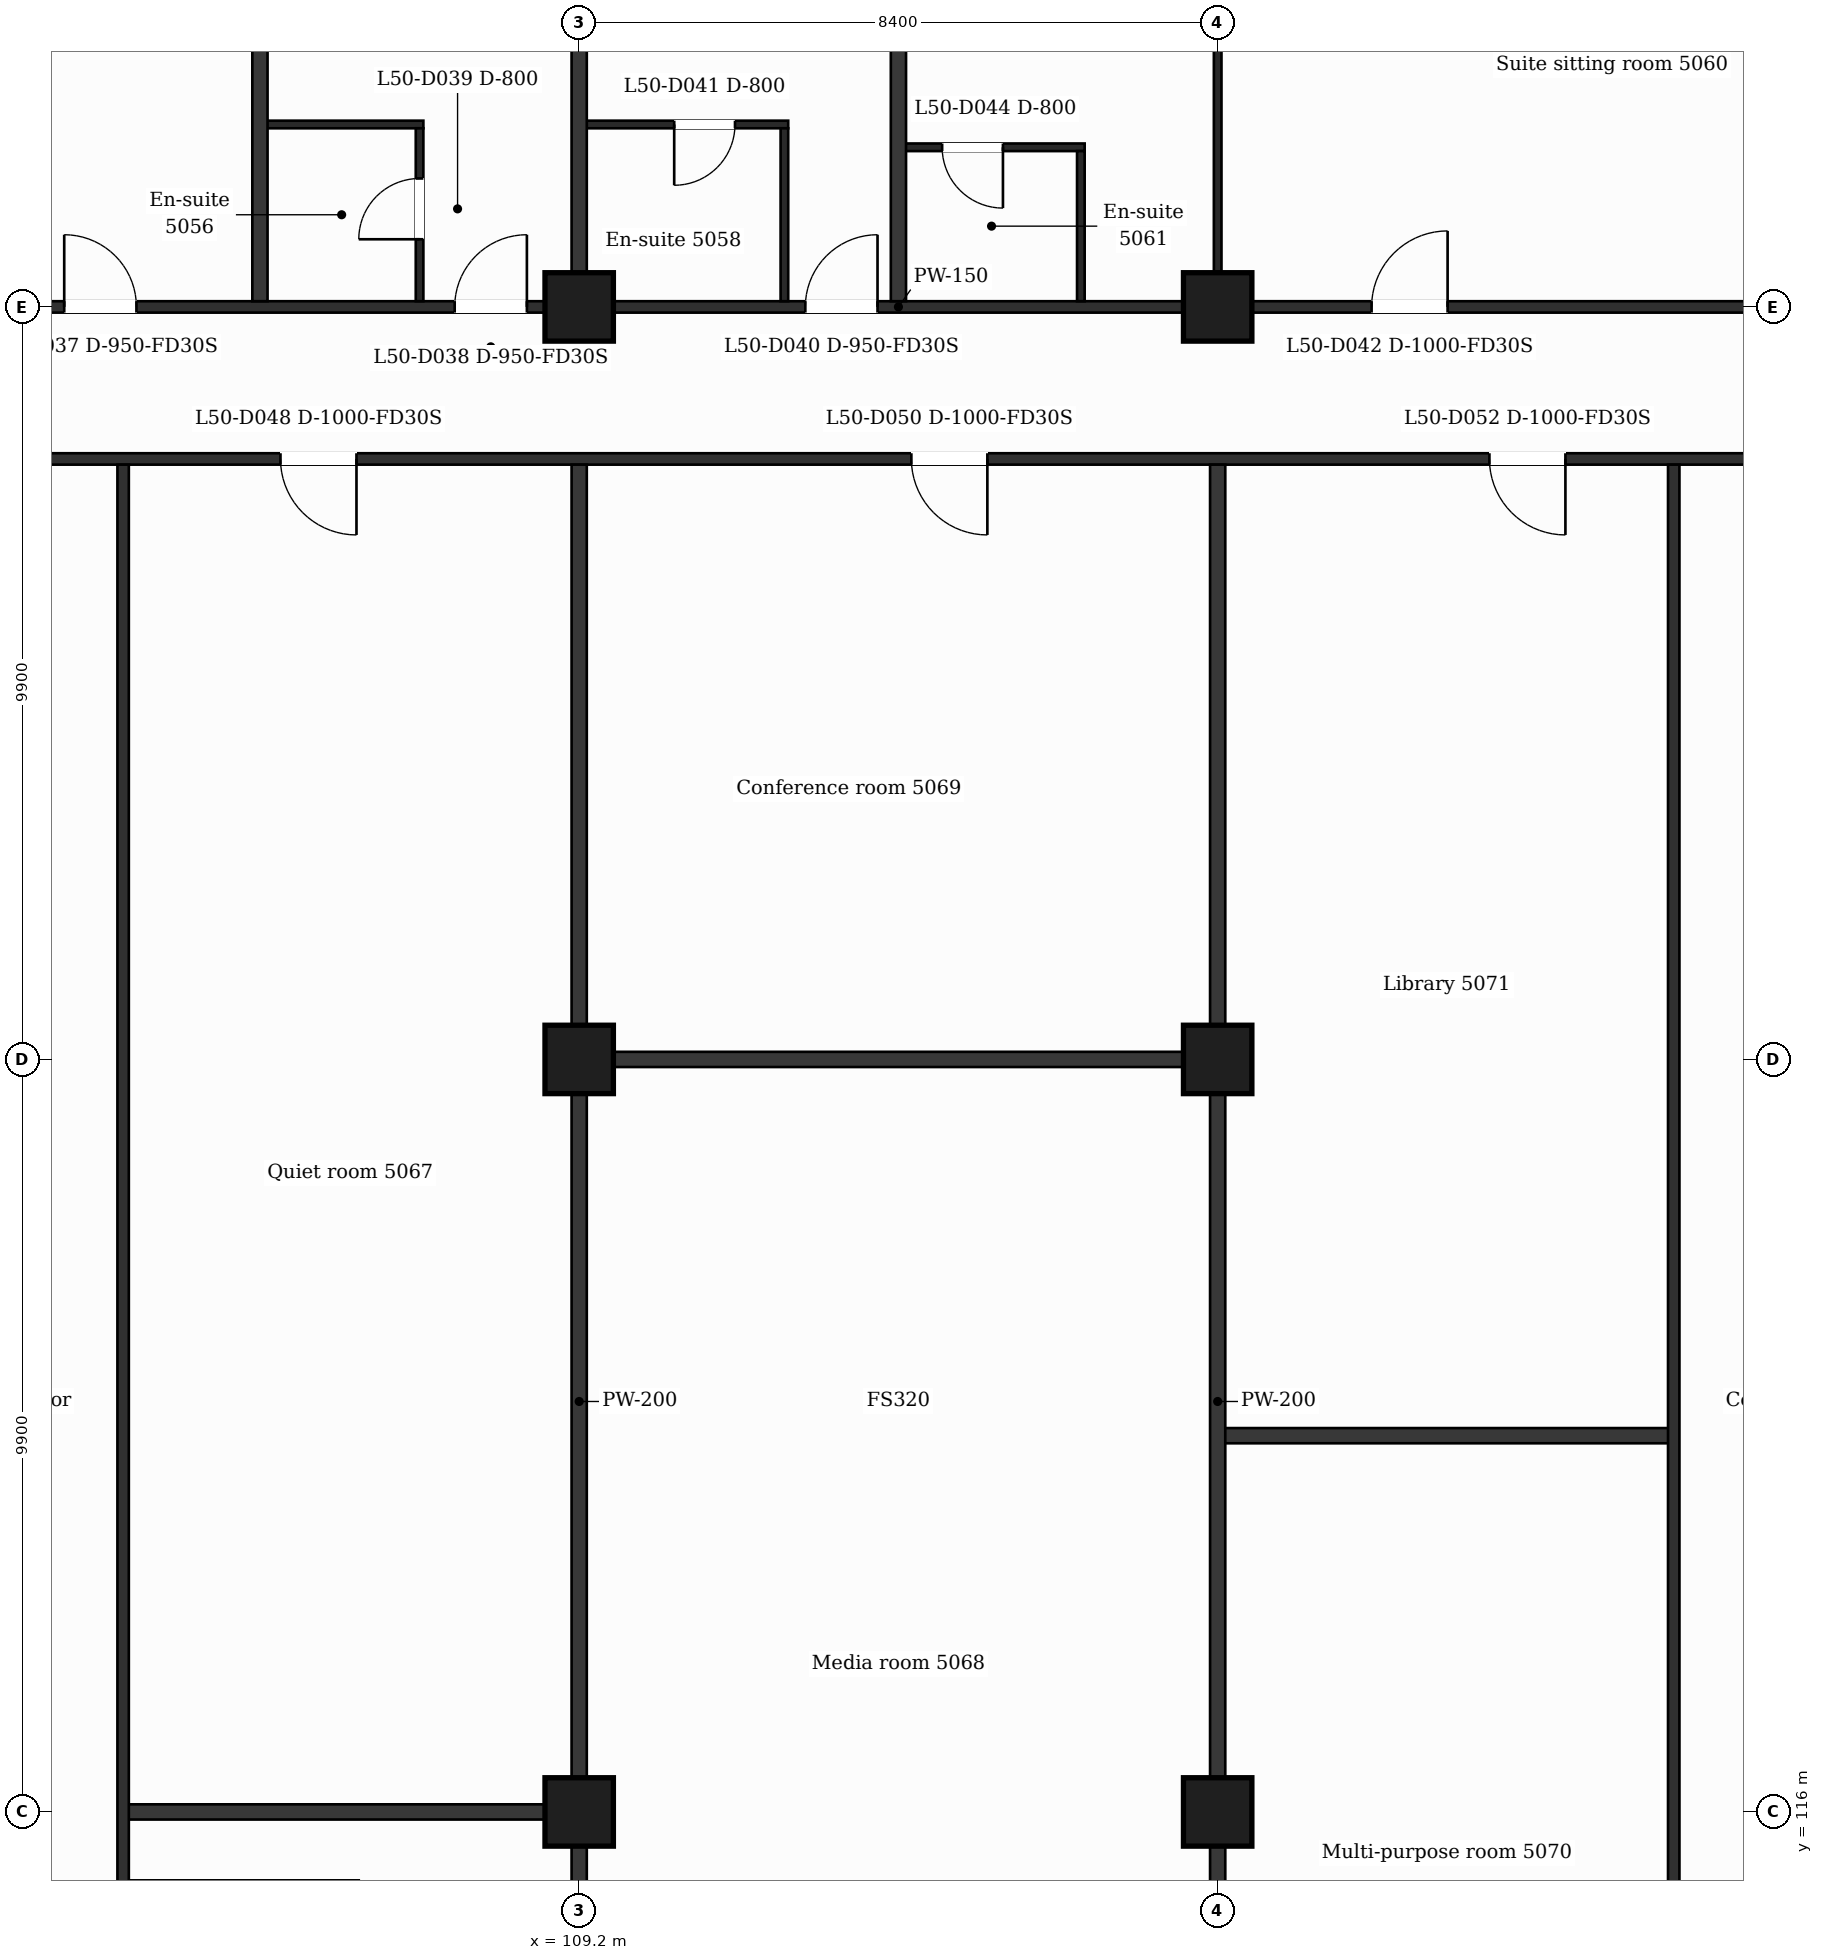
"""IFC4 building model, lengths in metres.
Left out: names, types, materials, properties, quantities, classifications, styles, units other than length and angle.
Written with IfcOpenShell. Run it as: python <this file> out.ifc"""

import sys

from ifc_helpers import new_model, si_unit, direction, frame, frame_2d, origin, origin_2d, place, context, subcontext, project, spatial, rectangle, extrude, element, fill, save


model = new_model("IFC4")
c1 = context("Model", 3, precision=1e-05, world=origin(), true_north=direction((0.0, 1.0)))
c2 = subcontext(c1, "Body", "Model", "MODEL_VIEW")
j1 = project(units=[si_unit("LENGTHUNIT", "METRE"), si_unit("PLANEANGLEUNIT", "RADIAN")], contexts=[c1])
p1 = place(None, origin())
s1 = spatial("IfcSite", under=j1, at=p1, CompositionType="ELEMENT")
p2 = place(p1, origin())
s2 = spatial("IfcBuilding", under=s1, at=p2, CompositionType="ELEMENT")
p3 = place(p2, frame((0.0, 0.0, 209.6)))
s3 = spatial("IfcBuildingStorey", under=s2, at=p3, CompositionType="ELEMENT", Elevation=209.6)
for number, where, z_axis, x_axis in (
    (1, (109.2, 116.0, 0.0), (0.0, 0.0, 1.0), (1.0, 0.0, 0.0)),
    (2, (117.6, 116.0, 0.0), (0.0, 0.0, 1.0), (1.0, 0.0, 0.0)),
    (3, (109.2, 125.9, 0.0), (0.0, 0.0, 1.0), (1.0, 0.0, 0.0)),
    (4, (117.6, 125.9, 0.0), (0.0, 0.0, 1.0), (1.0, 0.0, 0.0)),
    (5, (109.2, 135.8, 0.0), (0.0, 0.0, 1.0), (1.0, 0.0, 0.0)),
    (6, (117.6, 135.8, 0.0), (0.0, 0.0, 1.0), (1.0, 0.0, 0.0)),
):
    element("IfcColumn", number, at=place(p3, frame(where, z_axis=z_axis, x_axis=x_axis)), inside=s3, PredefinedType="COLUMN", context=c2, shape_type="SweptSolid", body=[
        extrude(rectangle(XDim=0.9, YDim=0.9, at=origin_2d()), origin(), (0.0, 0.0, 1.0), 3.7),
    ])
for number, where, z_axis, x_axis in (
    (7, (103.2, 116.0, 0.0), (0.0, 0.0, 1.0), (1.0, 0.0, 0.0)),
    (8, (117.6, 120.95, 0.0), (0.0, 0.0, 1.0), (1.0, 0.0, 0.0)),
):
    element("IfcWall", number, at=place(p3, frame(where, z_axis=z_axis, x_axis=x_axis)), inside=s3, PredefinedType="PARTITIONING", context=c2, shape_type="SweptSolid", body=[
        extrude(rectangle(XDim=6.0, YDim=0.2, at=frame_2d((3.0, 0.0))), origin(), (0.0, 0.0, 1.0), 3.38),
    ])
p4 = place(p3, frame((109.2, 125.9, 0.0), z_axis=(0.0, 0.0, 1.0), x_axis=(1.0, 0.0, 0.0)))
e9 = element("IfcWall", 9, at=p4, inside=s3, PredefinedType="PARTITIONING", context=c2, shape_type="SweptSolid", body=[
    extrude(rectangle(XDim=8.4, YDim=0.2, at=frame_2d((4.2, 0.0))), origin(), (0.0, 0.0, 1.0), 3.38),
])
p5 = place(p3, frame((100.725, 133.8, 0.0), z_axis=(0.0, 0.0, 1.0), x_axis=(1.0, 0.0, 0.0)))
e10 = element("IfcWall", 10, at=p5, inside=s3, PredefinedType="PARTITIONING", context=c2, shape_type="SweptSolid", body=[
    extrude(rectangle(XDim=25.35, YDim=0.15, at=frame_2d((12.675, 0.0))), origin(), (0.0, 0.0, 1.0), 3.38),
])
p6 = place(p5, frame((4.545, 0.0, 0.0)))
e11 = element("IfcOpeningElement", 11, at=p6, cuts=e10, PredefinedType="OPENING", context=c2, shape_type="SweptSolid", body=[
    extrude(rectangle(XDim=1.0, YDim=2.1, at=frame_2d((0.5, 1.05))), frame((0.0, 0.085, 0.0), z_axis=(0.0, -1.0, 0.0), x_axis=(1.0, 0.0, 0.0)), (0.0, 0.0, 1.0), 0.17),
])
p7 = place(p5, frame((12.845, 0.0, 0.0)))
e12 = element("IfcOpeningElement", 12, at=p7, cuts=e10, PredefinedType="OPENING", context=c2, shape_type="SweptSolid", body=[
    extrude(rectangle(XDim=1.0, YDim=2.1, at=frame_2d((0.5, 1.05))), frame((0.0, 0.085, 0.0), z_axis=(0.0, -1.0, 0.0), x_axis=(1.0, 0.0, 0.0)), (0.0, 0.0, 1.0), 0.17),
])
p8 = place(p5, frame((20.45, 0.0, 0.0)))
e13 = element("IfcOpeningElement", 13, at=p8, cuts=e10, PredefinedType="OPENING", context=c2, shape_type="SweptSolid", body=[
    extrude(rectangle(XDim=1.0, YDim=2.1, at=frame_2d((0.5, 1.05))), frame((0.0, 0.085, 0.0), z_axis=(0.0, -1.0, 0.0), x_axis=(1.0, 0.0, 0.0)), (0.0, 0.0, 1.0), 0.17),
])
p9 = place(p3, frame((90.895, 135.8, 0.0), z_axis=(0.0, 0.0, 1.0), x_axis=(1.0, 0.0, 0.0)))
e14 = element("IfcWall", 14, at=p9, inside=s3, PredefinedType="PARTITIONING", context=c2, shape_type="SweptSolid", body=[
    extrude(rectangle(XDim=45.011, YDim=0.15, at=frame_2d((22.505, 0.0))), origin(), (0.0, 0.0, 1.0), 3.38),
])
p10 = place(p9, frame((6.906, 0.0, 0.0)))
e15 = element("IfcOpeningElement", 15, at=p10, cuts=e14, PredefinedType="OPENING", context=c2, shape_type="SweptSolid", body=[
    extrude(rectangle(XDim=1.0, YDim=2.1, at=frame_2d((0.5, 1.05))), frame((0.0, 0.085, 0.0), z_axis=(0.0, -1.0, 0.0), x_axis=(1.0, 0.0, 0.0)), (0.0, 0.0, 1.0), 0.17),
])
p11 = place(p9, frame((11.531, 0.0, 0.0)))
e16 = element("IfcOpeningElement", 16, at=p11, cuts=e14, PredefinedType="OPENING", context=c2, shape_type="SweptSolid", body=[
    extrude(rectangle(XDim=0.95, YDim=2.1, at=frame_2d((0.475, 1.05))), frame((0.0, 0.085, 0.0), z_axis=(0.0, -1.0, 0.0), x_axis=(1.0, 0.0, 0.0)), (0.0, 0.0, 1.0), 0.17),
])
p12 = place(p9, frame((16.667, 0.0, 0.0)))
e17 = element("IfcOpeningElement", 17, at=p12, cuts=e14, PredefinedType="OPENING", context=c2, shape_type="SweptSolid", body=[
    extrude(rectangle(XDim=0.95, YDim=2.1, at=frame_2d((0.475, 1.05))), frame((0.0, 0.085, 0.0), z_axis=(0.0, -1.0, 0.0), x_axis=(1.0, 0.0, 0.0)), (0.0, 0.0, 1.0), 0.17),
])
p13 = place(p9, frame((21.281, 0.0, 0.0)))
e18 = element("IfcOpeningElement", 18, at=p13, cuts=e14, PredefinedType="OPENING", context=c2, shape_type="SweptSolid", body=[
    extrude(rectangle(XDim=0.95, YDim=2.1, at=frame_2d((0.475, 1.05))), frame((0.0, 0.085, 0.0), z_axis=(0.0, -1.0, 0.0), x_axis=(1.0, 0.0, 0.0)), (0.0, 0.0, 1.0), 0.17),
])
p14 = place(p9, frame((28.73, 0.0, 0.0)))
e19 = element("IfcOpeningElement", 19, at=p14, cuts=e14, PredefinedType="OPENING", context=c2, shape_type="SweptSolid", body=[
    extrude(rectangle(XDim=1.0, YDim=2.1, at=frame_2d((0.5, 1.05))), frame((0.0, 0.085, 0.0), z_axis=(0.0, -1.0, 0.0), x_axis=(1.0, 0.0, 0.0)), (0.0, 0.0, 1.0), 0.17),
])
p15 = place(p9, frame((39.814, 0.0, 0.0)))
e20 = element("IfcOpeningElement", 20, at=p15, cuts=e14, PredefinedType="OPENING", context=c2, shape_type="SweptSolid", body=[
    extrude(rectangle(XDim=0.95, YDim=2.1, at=frame_2d((0.475, 1.05))), frame((0.0, 0.085, 0.0), z_axis=(0.0, -1.0, 0.0), x_axis=(1.0, 0.0, 0.0)), (0.0, 0.0, 1.0), 0.17),
])
p16 = place(p3, frame((113.4, 137.9, 0.0), z_axis=(0.0, 0.0, 1.0), x_axis=(1.0, 0.0, 0.0)))
e21 = element("IfcWall", 21, at=p16, inside=s3, PredefinedType="PARTITIONING", context=c2, shape_type="SweptSolid", body=[
    extrude(rectangle(XDim=2.45, YDim=0.1, at=frame_2d((1.225, 0.0))), origin(), (0.0, 0.0, 1.0), 3.38),
])
p17 = place(p16, frame((0.575, 0.0, 0.0)))
e22 = element("IfcOpeningElement", 22, at=p17, cuts=e21, PredefinedType="OPENING", context=c2, shape_type="SweptSolid", body=[
    extrude(rectangle(XDim=0.8, YDim=2.1, at=frame_2d((0.4, 1.05))), frame((0.0, 0.06, 0.0), z_axis=(0.0, -1.0, 0.0), x_axis=(1.0, 0.0, 0.0)), (0.0, 0.0, 1.0), 0.12),
])
p18 = place(p3, frame((105.0, 138.2, 0.0), z_axis=(0.0, 0.0, 1.0), x_axis=(1.0, 0.0, 0.0)))
e23 = element("IfcWall", 23, at=p18, inside=s3, PredefinedType="PARTITIONING", context=c2, shape_type="SweptSolid", body=[
    extrude(rectangle(XDim=2.15, YDim=0.1, at=frame_2d((1.075, 0.0))), origin(), (0.0, 0.0, 1.0), 3.38),
])
p19 = place(p3, frame((109.2, 138.2, 0.0), z_axis=(0.0, 0.0, 1.0), x_axis=(1.0, 0.0, 0.0)))
e24 = element("IfcWall", 24, at=p19, inside=s3, PredefinedType="PARTITIONING", context=c2, shape_type="SweptSolid", body=[
    extrude(rectangle(XDim=2.75, YDim=0.1, at=frame_2d((1.375, 0.0))), origin(), (0.0, 0.0, 1.0), 3.38),
])
p20 = place(p19, frame((1.25, 0.0, 0.0)))
e25 = element("IfcOpeningElement", 25, at=p20, cuts=e24, PredefinedType="OPENING", context=c2, shape_type="SweptSolid", body=[
    extrude(rectangle(XDim=0.8, YDim=2.1, at=frame_2d((0.4, 1.05))), frame((0.0, 0.06, 0.0), z_axis=(0.0, -1.0, 0.0), x_axis=(1.0, 0.0, 0.0)), (0.0, 0.0, 1.0), 0.12),
])
p21 = place(p3, frame((103.2, 109.075, 0.0), z_axis=(0.0, 0.0, 1.0), x_axis=(0.0, 1.0, 0.0)))
e26 = element("IfcWall", 26, at=p21, inside=s3, PredefinedType="PARTITIONING", context=c2, shape_type="SweptSolid", body=[
    extrude(rectangle(XDim=24.65, YDim=0.15, at=frame_2d((12.325, 0.0))), origin(), (0.0, 0.0, 1.0), 3.38),
])
p22 = place(p3, frame((105.0, 135.875, 0.0), z_axis=(0.0, 0.0, 1.0), x_axis=(0.0, 1.0, 0.0)))
e27 = element("IfcWall", 27, at=p22, inside=s3, PredefinedType="PARTITIONING", context=c2, shape_type="SweptSolid", body=[
    extrude(rectangle(XDim=7.135, YDim=0.2, at=frame_2d((3.567, 0.0))), origin(), (0.0, 0.0, 1.0), 3.38),
])
p23 = place(p3, frame((107.1, 135.875, 0.0), z_axis=(0.0, 0.0, 1.0), x_axis=(0.0, 1.0, 0.0)))
e28 = element("IfcWall", 28, at=p23, inside=s3, PredefinedType="PARTITIONING", context=c2, shape_type="SweptSolid", body=[
    extrude(rectangle(XDim=2.275, YDim=0.1, at=frame_2d((1.137, 0.0))), origin(), (0.0, 0.0, 1.0), 3.38),
])
p24 = place(p23, frame((0.815, 0.0, 0.0)))
e29 = element("IfcOpeningElement", 29, at=p24, cuts=e28, PredefinedType="OPENING", context=c2, shape_type="SweptSolid", body=[
    extrude(rectangle(XDim=0.8, YDim=2.1, at=frame_2d((0.4, 1.05))), frame((0.0, 0.06, 0.0), z_axis=(0.0, -1.0, 0.0), x_axis=(1.0, 0.0, 0.0)), (0.0, 0.0, 1.0), 0.12),
])
p25 = place(p3, frame((109.2, 109.075, 0.0), z_axis=(0.0, 0.0, 1.0), x_axis=(0.0, 1.0, 0.0)))
e30 = element("IfcWall", 30, at=p25, inside=s3, PredefinedType="PARTITIONING", context=c2, shape_type="SweptSolid", body=[
    extrude(rectangle(XDim=24.65, YDim=0.2, at=frame_2d((12.325, 0.0))), origin(), (0.0, 0.0, 1.0), 3.38),
])
p26 = place(p3, frame((109.2, 135.875, 0.0), z_axis=(0.0, 0.0, 1.0), x_axis=(0.0, 1.0, 0.0)))
e31 = element("IfcWall", 31, at=p26, inside=s3, PredefinedType="PARTITIONING", context=c2, shape_type="SweptSolid", body=[
    extrude(rectangle(XDim=7.135, YDim=0.2, at=frame_2d((3.567, 0.0))), origin(), (0.0, 0.0, 1.0), 3.38),
])
p27 = place(p3, frame((111.9, 135.875, 0.0), z_axis=(0.0, 0.0, 1.0), x_axis=(0.0, 1.0, 0.0)))
e32 = element("IfcWall", 32, at=p27, inside=s3, PredefinedType="PARTITIONING", context=c2, shape_type="SweptSolid", body=[
    extrude(rectangle(XDim=2.275, YDim=0.1, at=frame_2d((1.137, 0.0))), origin(), (0.0, 0.0, 1.0), 3.38),
])
p28 = place(p3, frame((113.4, 135.875, 0.0), z_axis=(0.0, 0.0, 1.0), x_axis=(0.0, 1.0, 0.0)))
e33 = element("IfcWall", 33, at=p28, inside=s3, PredefinedType="PARTITIONING", context=c2, shape_type="SweptSolid", body=[
    extrude(rectangle(XDim=8.085, YDim=0.2, at=frame_2d((4.042, 0.0))), origin(), (0.0, 0.0, 1.0), 3.38),
])
p29 = place(p3, frame((115.8, 135.875, 0.0), z_axis=(0.0, 0.0, 1.0), x_axis=(0.0, 1.0, 0.0)))
e34 = element("IfcWall", 34, at=p29, inside=s3, PredefinedType="PARTITIONING", context=c2, shape_type="SweptSolid", body=[
    extrude(rectangle(XDim=1.975, YDim=0.1, at=frame_2d((0.988, 0.0))), origin(), (0.0, 0.0, 1.0), 3.38),
])
p30 = place(p3, frame((117.6, 135.875, 0.0), z_axis=(0.0, 0.0, 1.0), x_axis=(0.0, 1.0, 0.0)))
e35 = element("IfcWall", 35, at=p30, inside=s3, PredefinedType="PARTITIONING", context=c2, shape_type="SweptSolid", body=[
    extrude(rectangle(XDim=7.135, YDim=0.1, at=frame_2d((3.567, 0.0))), origin(), (0.0, 0.0, 1.0), 3.38),
])
p31 = place(p30, frame((5.29, 0.0, 0.0)))
e36 = element("IfcOpeningElement", 36, at=p31, cuts=e35, PredefinedType="OPENING", context=c2, shape_type="SweptSolid", body=[
    extrude(rectangle(XDim=0.9, YDim=2.1, at=frame_2d((0.45, 1.05))), frame((0.0, 0.06, 0.0), z_axis=(0.0, -1.0, 0.0), x_axis=(1.0, 0.0, 0.0)), (0.0, 0.0, 1.0), 0.12),
])
p32 = place(p3, frame((117.6, 109.075, 0.0), z_axis=(0.0, 0.0, 1.0), x_axis=(0.0, 1.0, 0.0)))
e37 = element("IfcWall", 37, at=p32, inside=s3, PredefinedType="PARTITIONING", context=c2, shape_type="SweptSolid", body=[
    extrude(rectangle(XDim=24.65, YDim=0.2, at=frame_2d((12.325, 0.0))), origin(), (0.0, 0.0, 1.0), 3.38),
])
p33 = place(p3, frame((123.6, 109.075, 0.0), z_axis=(0.0, 0.0, 1.0), x_axis=(0.0, 1.0, 0.0)))
e38 = element("IfcWall", 38, at=p33, inside=s3, PredefinedType="PARTITIONING", context=c2, shape_type="SweptSolid", body=[
    extrude(rectangle(XDim=24.65, YDim=0.15, at=frame_2d((12.325, 0.0))), origin(), (0.0, 0.0, 1.0), 3.38),
])
p34 = place(p11, origin())
e39 = element("IfcDoor", 39, at=p34, inside=s3, OperationType="SINGLE_SWING_LEFT", PredefinedType="DOOR", context=c2, shape_type="SweptSolid", body=[
    extrude(rectangle(XDim=0.95, YDim=2.1, at=frame_2d((0.475, 1.05))), frame((0.0, 0.025, 0.0), z_axis=(0.0, -1.0, 0.0), x_axis=(1.0, 0.0, 0.0)), (0.0, 0.0, 1.0), 0.05),
])
fill(e16, e39)
p35 = place(p12, origin())
e40 = element("IfcDoor", 40, at=p35, inside=s3, OperationType="SINGLE_SWING_RIGHT", PredefinedType="DOOR", context=c2, shape_type="SweptSolid", body=[
    extrude(rectangle(XDim=0.95, YDim=2.1, at=frame_2d((0.475, 1.05))), frame((0.0, 0.025, 0.0), z_axis=(0.0, -1.0, 0.0), x_axis=(1.0, 0.0, 0.0)), (0.0, 0.0, 1.0), 0.05),
])
fill(e17, e40)
p36 = place(p24, origin())
e41 = element("IfcDoor", 41, at=p36, inside=s3, OperationType="SINGLE_SWING_LEFT", PredefinedType="DOOR", context=c2, shape_type="SweptSolid", body=[
    extrude(rectangle(XDim=0.8, YDim=2.1, at=frame_2d((0.4, 1.05))), frame((0.0, 0.025, 0.0), z_axis=(0.0, -1.0, 0.0), x_axis=(1.0, 0.0, 0.0)), (0.0, 0.0, 1.0), 0.05),
])
fill(e29, e41)
p37 = place(p13, origin())
e42 = element("IfcDoor", 42, at=p37, inside=s3, OperationType="SINGLE_SWING_RIGHT", PredefinedType="DOOR", context=c2, shape_type="SweptSolid", body=[
    extrude(rectangle(XDim=0.95, YDim=2.1, at=frame_2d((0.475, 1.05))), frame((0.0, 0.025, 0.0), z_axis=(0.0, -1.0, 0.0), x_axis=(1.0, 0.0, 0.0)), (0.0, 0.0, 1.0), 0.05),
])
fill(e18, e42)
p38 = place(p20, origin())
e43 = element("IfcDoor", 43, at=p38, inside=s3, OperationType="SINGLE_SWING_LEFT", PredefinedType="DOOR", context=c2, shape_type="SweptSolid", body=[
    extrude(rectangle(XDim=0.8, YDim=2.1, at=frame_2d((0.4, 1.05))), frame((0.0, 0.025, 0.0), z_axis=(0.0, -1.0, 0.0), x_axis=(1.0, 0.0, 0.0)), (0.0, 0.0, 1.0), 0.05),
])
fill(e25, e43)
p39 = place(p14, origin())
e44 = element("IfcDoor", 44, at=p39, inside=s3, OperationType="SINGLE_SWING_RIGHT", PredefinedType="DOOR", context=c2, shape_type="SweptSolid", body=[
    extrude(rectangle(XDim=1.0, YDim=2.1, at=frame_2d((0.5, 1.05))), frame((0.0, 0.025, 0.0), z_axis=(0.0, -1.0, 0.0), x_axis=(1.0, 0.0, 0.0)), (0.0, 0.0, 1.0), 0.05),
])
fill(e19, e44)
p40 = place(p17, origin())
e45 = element("IfcDoor", 45, at=p40, inside=s3, OperationType="SINGLE_SWING_RIGHT", PredefinedType="DOOR", context=c2, shape_type="SweptSolid", body=[
    extrude(rectangle(XDim=0.8, YDim=2.1, at=frame_2d((0.4, 1.05))), frame((0.0, 0.025, 0.0), z_axis=(0.0, -1.0, 0.0), x_axis=(1.0, 0.0, 0.0)), (0.0, 0.0, 1.0), 0.05),
])
fill(e22, e45)
p41 = place(p6, origin())
e46 = element("IfcDoor", 46, at=p41, inside=s3, OperationType="SINGLE_SWING_RIGHT", PredefinedType="DOOR", context=c2, shape_type="SweptSolid", body=[
    extrude(rectangle(XDim=1.0, YDim=2.1, at=frame_2d((0.5, 1.05))), frame((0.0, 0.025, 0.0), z_axis=(0.0, -1.0, 0.0), x_axis=(1.0, 0.0, 0.0)), (0.0, 0.0, 1.0), 0.05),
])
fill(e11, e46)
p42 = place(p7, origin())
e47 = element("IfcDoor", 47, at=p42, inside=s3, OperationType="SINGLE_SWING_RIGHT", PredefinedType="DOOR", context=c2, shape_type="SweptSolid", body=[
    extrude(rectangle(XDim=1.0, YDim=2.1, at=frame_2d((0.5, 1.05))), frame((0.0, 0.025, 0.0), z_axis=(0.0, -1.0, 0.0), x_axis=(1.0, 0.0, 0.0)), (0.0, 0.0, 1.0), 0.05),
])
fill(e12, e47)
p43 = place(p8, origin())
e48 = element("IfcDoor", 48, at=p43, inside=s3, OperationType="SINGLE_SWING_RIGHT", PredefinedType="DOOR", context=c2, shape_type="SweptSolid", body=[
    extrude(rectangle(XDim=1.0, YDim=2.1, at=frame_2d((0.5, 1.05))), frame((0.0, 0.025, 0.0), z_axis=(0.0, -1.0, 0.0), x_axis=(1.0, 0.0, 0.0)), (0.0, 0.0, 1.0), 0.05),
])
fill(e13, e48)
save(model, sys.argv[1])
